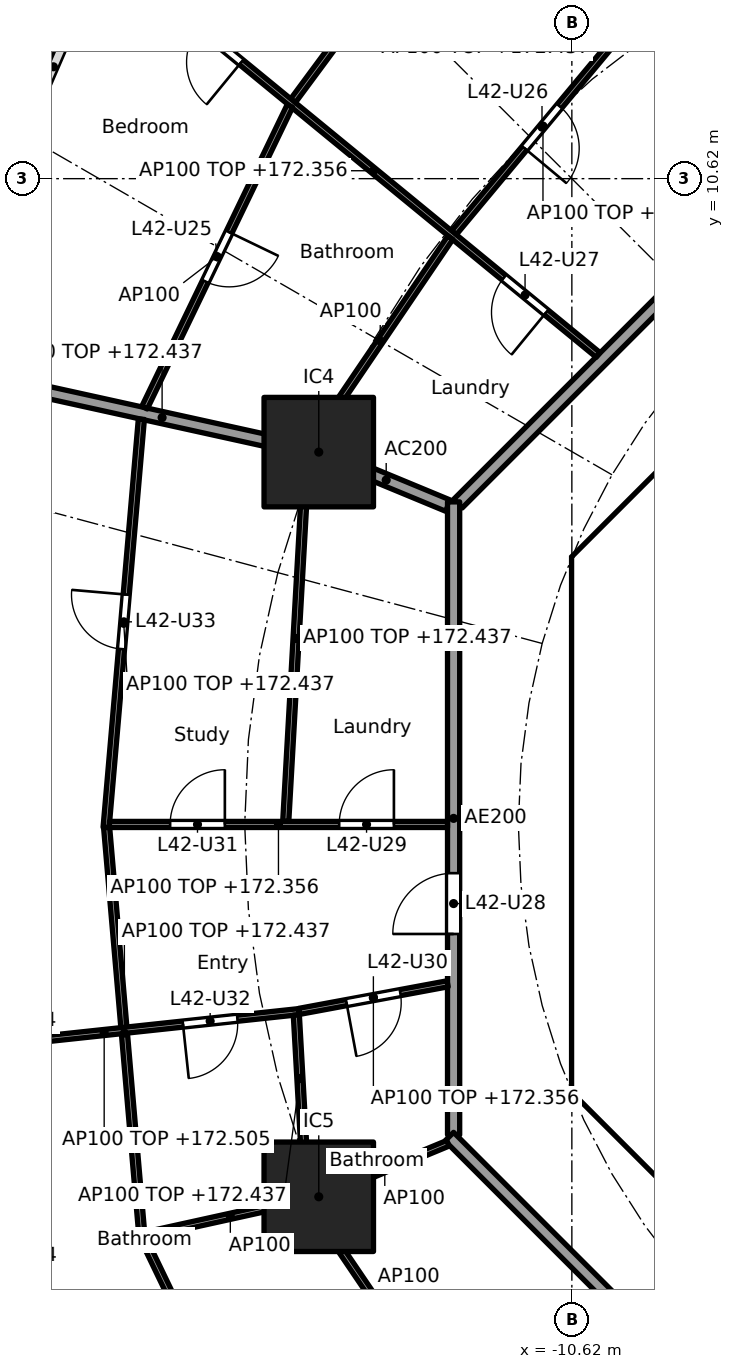
"""IFC4 building model, lengths in metres.
Left out: names, types, materials, properties, quantities, classifications, styles, units other than length and angle.
Written with IfcOpenShell. Run it as: python <this file> out.ifc"""

import sys

from ifc_helpers import new_model, si_unit, direction, frame, frame_2d, origin, origin_2d, place, context, subcontext, project, spatial, polyline, rectangle, outline, extrude, element, fill, save


model = new_model("IFC4")
c1 = context("Model", 3, precision=1e-05, world=origin(), true_north=direction((0.0, 1.0)))
c2 = subcontext(c1, "Body", "Model", "MODEL_VIEW")
j1 = project(units=[si_unit("LENGTHUNIT", "METRE"), si_unit("PLANEANGLEUNIT", "RADIAN")], contexts=[c1])
p1 = place(None, origin())
s1 = spatial("IfcSite", under=j1, at=p1, CompositionType="ELEMENT")
p2 = place(p1, origin())
s2 = spatial("IfcBuilding", under=s1, at=p2, CompositionType="ELEMENT")
p3 = place(p2, frame((0.0, 0.0, 169.6)))
s3 = spatial("IfcBuildingStorey", under=s2, at=p3, CompositionType="ELEMENT", Elevation=169.6)
for number, where, z_axis, x_axis in (
    (1, (-14.782, 6.123, 0.0), (0.0, 0.0, 1.0), (1.0, 0.0, 0.0)),
    (2, (-14.782, -6.123, 0.0), (0.0, 0.0, 1.0), (1.0, 0.0, 0.0)),
):
    element("IfcColumn", number, at=place(p3, frame(where, z_axis=z_axis, x_axis=x_axis)), inside=s3, PredefinedType="COLUMN", context=c2, shape_type="SweptSolid", body=[
        extrude(rectangle(XDim=1.8, YDim=1.8, at=origin_2d()), origin(), (0.0, 0.0, 1.0), 3.7),
    ])
p4 = place(p3, frame((-4.613, 9.988, 0.0), z_axis=(0.0, 0.0, 1.0), x_axis=(-0.707106781187, -0.707106781187, 0.0)))
e3 = element("IfcWall", 3, at=p4, inside=s3, PredefinedType="SHEAR", context=c2, shape_type="SweptSolid", body=[
    extrude(rectangle(XDim=7.602, YDim=0.6, at=frame_2d((3.801, 0.0))), origin(), (0.0, 0.0, 1.0), 3.44),
])
p5 = place(p4, frame((0.351, 0.0, 0.0)))
e4 = element("IfcOpeningElement", 4, at=p5, cuts=e3, PredefinedType="OPENING", context=c2, shape_type="SweptSolid", body=[
    extrude(rectangle(XDim=1.1, YDim=2.1, at=frame_2d((0.55, 1.05))), frame((0.0, 0.31, 0.0), z_axis=(0.0, -1.0, 0.0), x_axis=(1.0, 0.0, 0.0)), (0.0, 0.0, 1.0), 0.62),
])
p6 = place(p3, frame((-10.325, 3.801, 0.0), z_axis=(0.0, 0.0, 1.0), x_axis=(0.0, -1.0, 0.0)))
e5 = element("IfcWall", 5, at=p6, inside=s3, PredefinedType="SHEAR", context=c2, shape_type="SweptSolid", body=[
    extrude(rectangle(XDim=7.602, YDim=0.6, at=frame_2d((3.801, 0.0))), origin(), (0.0, 0.0, 1.0), 3.44),
])
p7 = place(p6, frame((0.651, 0.0, 0.0)))
e6 = element("IfcOpeningElement", 6, at=p7, cuts=e5, PredefinedType="OPENING", context=c2, shape_type="SweptSolid", body=[
    extrude(rectangle(XDim=1.5, YDim=2.1, at=frame_2d((0.75, 1.05))), frame((0.0, 0.31, 0.0), z_axis=(0.0, -1.0, 0.0), x_axis=(1.0, 0.0, 0.0)), (0.0, 0.0, 1.0), 0.62),
])
p8 = place(p6, frame((5.451, 0.0, 0.0)))
e7 = element("IfcOpeningElement", 7, at=p8, cuts=e5, PredefinedType="OPENING", context=c2, shape_type="SweptSolid", body=[
    extrude(rectangle(XDim=1.5, YDim=2.1, at=frame_2d((0.75, 1.05))), frame((0.0, 0.31, 0.0), z_axis=(0.0, -1.0, 0.0), x_axis=(1.0, 0.0, 0.0)), (0.0, 0.0, 1.0), 0.62),
])
p9 = place(p3, frame((-9.988, -4.613, 0.0), z_axis=(0.0, 0.0, 1.0), x_axis=(0.707106781187, -0.707106781187, 0.0)))
e8 = element("IfcWall", 8, at=p9, inside=s3, PredefinedType="SHEAR", context=c2, shape_type="SweptSolid", body=[
    extrude(rectangle(XDim=7.602, YDim=0.6, at=frame_2d((3.801, 0.0))), origin(), (0.0, 0.0, 1.0), 3.44),
])
p10 = place(p9, frame((6.151, 0.0, 0.0)))
e9 = element("IfcOpeningElement", 9, at=p10, cuts=e8, PredefinedType="OPENING", context=c2, shape_type="SweptSolid", body=[
    extrude(rectangle(XDim=1.1, YDim=2.1, at=frame_2d((0.55, 1.05))), frame((0.0, 0.31, 0.0), z_axis=(0.0, -1.0, 0.0), x_axis=(1.0, 0.0, 0.0)), (0.0, 0.0, 1.0), 0.62),
])
p11 = place(p3, origin())
e10 = element("IfcWall", 10, at=p11, inside=s3, PredefinedType="SHEAR", context=c2, shape_type="SweptSolid", body=[
    extrude(outline(polyline([(-10.625, -3.801), (-10.025, -3.801), (-10.025, -4.152), (-9.776, -4.401), (-10.2, -4.825), (-10.625, -4.401), (-10.625, -3.801)])), origin(), (0.0, 0.0, 1.0), 3.44),
])
p12 = place(p3, origin())
e11 = element("IfcWall", 11, at=p12, inside=s3, PredefinedType="SHEAR", context=c2, shape_type="SweptSolid", body=[
    extrude(outline(polyline([(-10.2, 4.825), (-9.776, 4.401), (-10.025, 4.152), (-10.025, 3.801), (-10.625, 3.801), (-10.625, 4.401), (-10.2, 4.825)])), origin(), (0.0, 0.0, 1.0), 3.44),
])
for number, where, z_axis, x_axis in (
    (12, (-10.025, -4.0, 0.0), (0.0, 0.0, 1.0), (1.0, 0.0, 0.0)),
    (13, (-10.025, 4.0, 0.0), (0.0, 0.0, 1.0), (1.0, 0.0, 0.0)),
):
    element("IfcWall", number, at=place(p3, frame(where, z_axis=z_axis, x_axis=x_axis)), inside=s3, PredefinedType="PARTITIONING", context=c2, shape_type="SweptSolid", body=[
        extrude(rectangle(XDim=3.325, YDim=0.2, at=frame_2d((1.662, 0.0))), origin(), (0.0, 0.0, 1.0), 3.44),
    ])
p13 = place(p3, frame((-12.657, 5.243, 0.0), z_axis=(0.0, 0.0, 1.0), x_axis=(-0.923859888513, 0.38273085373, 0.0)))
e14 = element("IfcWall", 14, at=p13, inside=s3, PredefinedType="PARTITIONING", context=c2, shape_type="SweptSolid", body=[
    extrude(rectangle(XDim=2.199, YDim=0.2, at=frame_2d((1.1, 0.0))), origin(), (0.0, 0.0, 1.0), 3.44),
])
p14 = place(p3, frame((-14.831, 6.134, 0.0), z_axis=(0.0, 0.0, 1.0), x_axis=(-0.976568396888, 0.215207263354, 0.0)))
e15 = element("IfcWall", 15, at=p14, inside=s3, PredefinedType="PARTITIONING", context=c2, shape_type="SweptSolid", body=[
    extrude(rectangle(XDim=5.177, YDim=0.2, at=frame_2d((2.588, 0.0))), origin(), (0.0, 0.0, 1.0), 2.837),
])
p15 = place(p3, frame((-5.275, 12.494, 0.0), z_axis=(0.0, 0.0, 1.0), x_axis=(-0.707106781187, -0.707106781187, 0.0)))
e16 = element("IfcWall", 16, at=p15, inside=s3, PredefinedType="PARTITIONING", context=c2, shape_type="SweptSolid", body=[
    extrude(rectangle(XDim=10.209, YDim=0.2, at=frame_2d((5.104, 0.0))), origin(), (0.0, 0.0, 1.0), 3.44),
])
p16 = place(p3, frame((-12.565, 5.304, 0.0), z_axis=(0.0, 0.0, 1.0), x_axis=(0.0, -1.0, 0.0)))
e17 = element("IfcWall", 17, at=p16, inside=s3, PredefinedType="PARTITIONING", context=c2, shape_type="SweptSolid", body=[
    extrude(rectangle(XDim=10.409, YDim=0.2, at=frame_2d((5.205, 0.0))), origin(), (0.0, 0.0, 1.0), 3.44),
])
p17 = place(p16, frame((6.106, 0.0, 0.0)))
e18 = element("IfcOpeningElement", 18, at=p17, cuts=e17, PredefinedType="OPENING", context=c2, shape_type="SweptSolid", body=[
    extrude(rectangle(XDim=1.0, YDim=2.1, at=frame_2d((0.5, 1.05))), frame((0.0, 0.11, 0.0), z_axis=(0.0, -1.0, 0.0), x_axis=(1.0, 0.0, 0.0)), (0.0, 0.0, 1.0), 0.22),
])
p18 = place(p3, frame((-12.635, -5.134, 0.0), z_axis=(0.0, 0.0, 1.0), x_axis=(0.707106781187, -0.707106781187, 0.0)))
e19 = element("IfcWall", 19, at=p18, inside=s3, PredefinedType="PARTITIONING", context=c2, shape_type="SweptSolid", body=[
    extrude(rectangle(XDim=10.609, YDim=0.2, at=frame_2d((5.305, 0.0))), origin(), (0.0, 0.0, 1.0), 3.44),
])
p19 = place(p3, frame((-9.631, 13.242, 0.0), z_axis=(0.0, 0.0, 1.0), x_axis=(-0.640315711982, -0.768111833647, 0.0)))
e20 = element("IfcWall", 20, at=p19, inside=s3, PredefinedType="PARTITIONING", context=c2, shape_type="SweptSolid", body=[
    extrude(rectangle(XDim=4.572, YDim=0.1, at=frame_2d((2.286, 0.0))), origin(), (0.0, 0.0, 1.0), 2.837),
])
p20 = place(p19, frame((1.861, 0.0, 0.0)))
e21 = element("IfcOpeningElement", 21, at=p20, cuts=e20, PredefinedType="OPENING", context=c2, shape_type="SweptSolid", body=[
    extrude(rectangle(XDim=0.9, YDim=2.1, at=frame_2d((0.45, 1.05))), frame((0.0, 0.06, 0.0), z_axis=(0.0, -1.0, 0.0), x_axis=(1.0, 0.0, 0.0)), (0.0, 0.0, 1.0), 0.12),
])
p21 = place(p3, frame((-11.773, 16.542, 0.0), z_axis=(0.0, 0.0, 1.0), x_axis=(-0.594694305999, -0.803951915485, 0.0)))
e22 = element("IfcWall", 22, at=p21, inside=s3, PredefinedType="PARTITIONING", context=c2, shape_type="SweptSolid", body=[
    extrude(rectangle(XDim=5.772, YDim=0.1, at=frame_2d((2.886, 0.0))), origin(), (0.0, 0.0, 1.0), 2.837),
])
p22 = place(p21, frame((2.461, 0.0, 0.0)))
e23 = element("IfcOpeningElement", 23, at=p22, cuts=e22, PredefinedType="OPENING", context=c2, shape_type="SweptSolid", body=[
    extrude(rectangle(XDim=0.9, YDim=2.1, at=frame_2d((0.45, 1.05))), frame((0.0, 0.06, 0.0), z_axis=(0.0, -1.0, 0.0), x_axis=(1.0, 0.0, 0.0)), (0.0, 0.0, 1.0), 0.12),
])
p23 = place(p3, frame((-10.189, 7.721, 0.0), z_axis=(0.0, 0.0, 1.0), x_axis=(-0.773134429339, 0.634242188892, 0.0)))
e24 = element("IfcWall", 24, at=p23, inside=s3, PredefinedType="PARTITIONING", context=c2, shape_type="SweptSolid", body=[
    extrude(rectangle(XDim=9.552, YDim=0.1, at=frame_2d((4.776, 0.0))), origin(), (0.0, 0.0, 1.0), 2.756),
])
p24 = place(p23, frame((7.59, 0.0, 0.0)))
e25 = element("IfcOpeningElement", 25, at=p24, cuts=e24, PredefinedType="OPENING", context=c2, shape_type="SweptSolid", body=[
    extrude(rectangle(XDim=0.9, YDim=2.1, at=frame_2d((0.45, 1.05))), frame((0.0, 0.06, 0.0), z_axis=(0.0, -1.0, 0.0), x_axis=(1.0, 0.0, 0.0)), (0.0, 0.0, 1.0), 0.12),
])
p25 = place(p23, frame((1.104, 0.0, 0.0)))
e26 = element("IfcOpeningElement", 26, at=p25, cuts=e24, PredefinedType="OPENING", context=c2, shape_type="SweptSolid", body=[
    extrude(rectangle(XDim=0.9, YDim=2.1, at=frame_2d((0.45, 1.05))), frame((0.0, 0.06, 0.0), z_axis=(0.0, -1.0, 0.0), x_axis=(1.0, 0.0, 0.0)), (0.0, 0.0, 1.0), 0.12),
])
p26 = place(p3, frame((-12.619, 9.65, 0.0), z_axis=(0.0, 0.0, 1.0), x_axis=(-0.561046521684, -0.82778427172, 0.0)))
e27 = element("IfcWall", 27, at=p26, inside=s3, PredefinedType="PARTITIONING", context=c2, shape_type="SweptSolid", body=[
    extrude(rectangle(XDim=4.109, YDim=0.1, at=frame_2d((2.054, 0.0))), origin(), (0.0, 0.0, 1.0), 3.44),
])
p27 = place(p3, frame((-15.257, 11.816, 0.0), z_axis=(0.0, 0.0, 1.0), x_axis=(-0.434027506504, -0.900899619046, 0.0)))
e28 = element("IfcWall", 28, at=p27, inside=s3, PredefinedType="PARTITIONING", context=c2, shape_type="SweptSolid", body=[
    extrude(rectangle(XDim=5.508, YDim=0.1, at=frame_2d((2.754, 0.0))), origin(), (0.0, 0.0, 1.0), 3.44),
])
p28 = place(p27, frame((2.304, 0.0, 0.0)))
e29 = element("IfcOpeningElement", 29, at=p28, cuts=e28, PredefinedType="OPENING", context=c2, shape_type="SweptSolid", body=[
    extrude(rectangle(XDim=0.9, YDim=2.1, at=frame_2d((0.45, 1.05))), frame((0.0, 0.06, 0.0), z_axis=(0.0, -1.0, 0.0), x_axis=(1.0, 0.0, 0.0)), (0.0, 0.0, 1.0), 0.12),
])
p29 = place(p3, frame((-14.986, 6.067, 0.0), z_axis=(0.0, 0.0, 1.0), x_axis=(-0.056311398802, -0.998413254302, 0.0)))
e30 = element("IfcWall", 30, at=p29, inside=s3, PredefinedType="PARTITIONING", context=c2, shape_type="SweptSolid", body=[
    extrude(rectangle(XDim=6.026, YDim=0.1, at=frame_2d((3.013, 0.0))), origin(), (0.0, 0.0, 1.0), 2.837),
])
p30 = place(p3, frame((-17.7, 6.664, 0.0), z_axis=(0.0, 0.0, 1.0), x_axis=(-0.086004282666, -0.996294767307, 0.0)))
e31 = element("IfcWall", 31, at=p30, inside=s3, PredefinedType="PARTITIONING", context=c2, shape_type="SweptSolid", body=[
    extrude(rectangle(XDim=6.739, YDim=0.1, at=frame_2d((3.37, 0.0))), origin(), (0.0, 0.0, 1.0), 2.837),
])
p31 = place(p30, frame((2.895, 0.0, 0.0)))
e32 = element("IfcOpeningElement", 32, at=p31, cuts=e31, PredefinedType="OPENING", context=c2, shape_type="SweptSolid", body=[
    extrude(rectangle(XDim=0.9, YDim=2.1, at=frame_2d((0.45, 1.05))), frame((0.0, 0.06, 0.0), z_axis=(0.0, -1.0, 0.0), x_axis=(1.0, 0.0, 0.0)), (0.0, 0.0, 1.0), 0.12),
])
p32 = place(p3, frame((-12.665, 0.0, 0.0), z_axis=(0.0, 0.0, 1.0), x_axis=(-1.0, 0.0, 0.0)))
e33 = element("IfcWall", 33, at=p32, inside=s3, PredefinedType="PARTITIONING", context=c2, shape_type="SweptSolid", body=[
    extrude(rectangle(XDim=5.56, YDim=0.1, at=frame_2d((2.78, 0.0))), origin(), (0.0, 0.0, 1.0), 2.756),
])
p33 = place(p32, frame((0.882, 0.0, 0.0)))
e34 = element("IfcOpeningElement", 34, at=p33, cuts=e33, PredefinedType="OPENING", context=c2, shape_type="SweptSolid", body=[
    extrude(rectangle(XDim=0.9, YDim=2.1, at=frame_2d((0.45, 1.05))), frame((0.0, 0.06, 0.0), z_axis=(0.0, -1.0, 0.0), x_axis=(1.0, 0.0, 0.0)), (0.0, 0.0, 1.0), 0.12),
])
p34 = place(p32, frame((3.662, 0.0, 0.0)))
e35 = element("IfcOpeningElement", 35, at=p34, cuts=e33, PredefinedType="OPENING", context=c2, shape_type="SweptSolid", body=[
    extrude(rectangle(XDim=0.9, YDim=2.1, at=frame_2d((0.45, 1.05))), frame((0.0, 0.06, 0.0), z_axis=(0.0, -1.0, 0.0), x_axis=(1.0, 0.0, 0.0)), (0.0, 0.0, 1.0), 0.12),
])
p35 = place(p3, frame((-18.271, -0.05, 0.0), z_axis=(0.0, 0.0, 1.0), x_axis=(0.086018199227, -0.996293565874, 0.0)))
e36 = element("IfcWall", 36, at=p35, inside=s3, PredefinedType="PARTITIONING", context=c2, shape_type="SweptSolid", body=[
    extrude(rectangle(XDim=6.789, YDim=0.1, at=frame_2d((3.395, 0.0))), origin(), (0.0, 0.0, 1.0), 2.837),
])
p36 = place(p3, frame((-12.663, -2.621, 0.0), z_axis=(0.0, 0.0, 1.0), x_axis=(-0.983176884312, -0.182655999505, 0.0)))
e37 = element("IfcWall", 37, at=p36, inside=s3, PredefinedType="PARTITIONING", context=c2, shape_type="SweptSolid", body=[
    extrude(rectangle(XDim=2.483, YDim=0.1, at=frame_2d((1.242, 0.0))), origin(), (0.0, 0.0, 1.0), 2.756),
])
p37 = place(p36, frame((0.792, 0.0, 0.0)))
e38 = element("IfcOpeningElement", 38, at=p37, cuts=e37, PredefinedType="OPENING", context=c2, shape_type="SweptSolid", body=[
    extrude(rectangle(XDim=0.9, YDim=2.1, at=frame_2d((0.45, 1.05))), frame((0.0, 0.06, 0.0), z_axis=(0.0, -1.0, 0.0), x_axis=(1.0, 0.0, 0.0)), (0.0, 0.0, 1.0), 0.12),
])
p38 = place(p3, frame((-15.104, -3.078, 0.0), z_axis=(0.0, 0.0, 1.0), x_axis=(-0.994316167803, -0.106467640365, 0.0)))
e39 = element("IfcWall", 39, at=p38, inside=s3, PredefinedType="PARTITIONING", context=c2, shape_type="SweptSolid", body=[
    extrude(rectangle(XDim=6.45, YDim=0.1, at=frame_2d((3.225, 0.0))), origin(), (0.0, 0.0, 1.0), 2.905),
])
p39 = place(p38, frame((1.022, 0.0, 0.0)))
e40 = element("IfcOpeningElement", 40, at=p39, cuts=e39, PredefinedType="OPENING", context=c2, shape_type="SweptSolid", body=[
    extrude(rectangle(XDim=0.9, YDim=2.1, at=frame_2d((0.45, 1.05))), frame((0.0, 0.06, 0.0), z_axis=(0.0, -1.0, 0.0), x_axis=(1.0, 0.0, 0.0)), (0.0, 0.0, 1.0), 0.12),
])
p40 = place(p38, frame((4.223, 0.0, 0.0)))
e41 = element("IfcOpeningElement", 41, at=p40, cuts=e39, PredefinedType="OPENING", context=c2, shape_type="SweptSolid", body=[
    extrude(rectangle(XDim=0.9, YDim=2.1, at=frame_2d((0.45, 1.05))), frame((0.0, 0.06, 0.0), z_axis=(0.0, -1.0, 0.0), x_axis=(1.0, 0.0, 0.0)), (0.0, 0.0, 1.0), 0.12),
])
p41 = place(p3, frame((-15.151, -3.133, 0.0), z_axis=(0.0, 0.0, 1.0), x_axis=(0.05637501378, -0.998409664327, 0.0)))
e42 = element("IfcWall", 42, at=p41, inside=s3, PredefinedType="PARTITIONING", context=c2, shape_type="SweptSolid", body=[
    extrude(rectangle(XDim=2.988, YDim=0.1, at=frame_2d((1.494, 0.0))), origin(), (0.0, 0.0, 1.0), 2.837),
])
p42 = place(p3, frame((-12.657, -5.243, 0.0), z_axis=(0.0, 0.0, 1.0), x_axis=(-0.923848837015, -0.382757529444, 0.0)))
e43 = element("IfcWall", 43, at=p42, inside=s3, PredefinedType="PARTITIONING", context=c2, shape_type="SweptSolid", body=[
    extrude(rectangle(XDim=2.25, YDim=0.1, at=frame_2d((1.125, 0.0))), origin(), (0.0, 0.0, 1.0), 3.44),
])
p43 = place(p3, frame((-14.831, -6.134, 0.0), z_axis=(0.0, 0.0, 1.0), x_axis=(-0.976560749847, -0.215241961191, 0.0)))
e44 = element("IfcWall", 44, at=p43, inside=s3, PredefinedType="PARTITIONING", context=c2, shape_type="SweptSolid", body=[
    extrude(rectangle(XDim=2.879, YDim=0.1, at=frame_2d((1.439, 0.0))), origin(), (0.0, 0.0, 1.0), 3.44),
])
p44 = place(p3, frame((-14.952, -6.208, 0.0), z_axis=(0.0, 0.0, 1.0), x_axis=(0.561064907171, -0.827771810308, 0.0)))
e45 = element("IfcWall", 45, at=p44, inside=s3, PredefinedType="PARTITIONING", context=c2, shape_type="SweptSolid", body=[
    extrude(rectangle(XDim=4.159, YDim=0.1, at=frame_2d((2.079, 0.0))), origin(), (0.0, 0.0, 1.0), 3.44),
])
p45 = place(p3, frame((-17.669, -6.809, 0.0), z_axis=(0.0, 0.0, 1.0), x_axis=(0.434040130629, -0.900893536997, 0.0)))
e46 = element("IfcWall", 46, at=p45, inside=s3, PredefinedType="PARTITIONING", context=c2, shape_type="SweptSolid", body=[
    extrude(rectangle(XDim=5.558, YDim=0.1, at=frame_2d((2.779, 0.0))), origin(), (0.0, 0.0, 1.0), 3.44),
])
p46 = place(p45, frame((2.329, 0.0, 0.0)))
e47 = element("IfcOpeningElement", 47, at=p46, cuts=e46, PredefinedType="OPENING", context=c2, shape_type="SweptSolid", body=[
    extrude(rectangle(XDim=0.9, YDim=2.1, at=frame_2d((0.45, 1.05))), frame((0.0, 0.06, 0.0), z_axis=(0.0, -1.0, 0.0), x_axis=(1.0, 0.0, 0.0)), (0.0, 0.0, 1.0), 0.12),
])
p47 = place(p7, origin())
e48 = element("IfcDoor", 48, at=p47, inside=s3, OperationType="DOUBLE_DOOR_SINGLE_SWING", PredefinedType="DOOR", context=c2, shape_type="SweptSolid", body=[
    extrude(rectangle(XDim=1.5, YDim=2.1, at=frame_2d((0.75, 1.05))), frame((0.0, 0.025, 0.0), z_axis=(0.0, -1.0, 0.0), x_axis=(1.0, 0.0, 0.0)), (0.0, 0.0, 1.0), 0.05),
])
fill(e6, e48)
p48 = place(p8, origin())
e49 = element("IfcDoor", 49, at=p48, inside=s3, OperationType="DOUBLE_DOOR_SINGLE_SWING", PredefinedType="DOOR", context=c2, shape_type="SweptSolid", body=[
    extrude(rectangle(XDim=1.5, YDim=2.1, at=frame_2d((0.75, 1.05))), frame((0.0, 0.025, 0.0), z_axis=(0.0, -1.0, 0.0), x_axis=(1.0, 0.0, 0.0)), (0.0, 0.0, 1.0), 0.05),
])
fill(e7, e49)
p49 = place(p24, origin())
e50 = element("IfcDoor", 50, at=p49, inside=s3, OperationType="SINGLE_SWING_LEFT", PredefinedType="DOOR", context=c2, shape_type="SweptSolid", body=[
    extrude(rectangle(XDim=0.9, YDim=2.1, at=frame_2d((0.45, 1.05))), frame((0.0, 0.025, 0.0), z_axis=(0.0, -1.0, 0.0), x_axis=(1.0, 0.0, 0.0)), (0.0, 0.0, 1.0), 0.05),
])
fill(e25, e50)
p50 = place(p28, origin())
e51 = element("IfcDoor", 51, at=p50, inside=s3, OperationType="SINGLE_SWING_LEFT", PredefinedType="DOOR", context=c2, shape_type="SweptSolid", body=[
    extrude(rectangle(XDim=0.9, YDim=2.1, at=frame_2d((0.45, 1.05))), frame((0.0, 0.025, 0.0), z_axis=(0.0, -1.0, 0.0), x_axis=(1.0, 0.0, 0.0)), (0.0, 0.0, 1.0), 0.05),
])
fill(e29, e51)
p51 = place(p20, origin())
e52 = element("IfcDoor", 52, at=p51, inside=s3, OperationType="SINGLE_SWING_RIGHT", PredefinedType="DOOR", context=c2, shape_type="SweptSolid", body=[
    extrude(rectangle(XDim=0.9, YDim=2.1, at=frame_2d((0.45, 1.05))), frame((0.0, 0.025, 0.0), z_axis=(0.0, -1.0, 0.0), x_axis=(1.0, 0.0, 0.0)), (0.0, 0.0, 1.0), 0.05),
])
fill(e21, e52)
p52 = place(p25, origin())
e53 = element("IfcDoor", 53, at=p52, inside=s3, OperationType="SINGLE_SWING_LEFT", PredefinedType="DOOR", context=c2, shape_type="SweptSolid", body=[
    extrude(rectangle(XDim=0.9, YDim=2.1, at=frame_2d((0.45, 1.05))), frame((0.0, 0.025, 0.0), z_axis=(0.0, -1.0, 0.0), x_axis=(1.0, 0.0, 0.0)), (0.0, 0.0, 1.0), 0.05),
])
fill(e26, e53)
p53 = place(p17, frame((1.0, 0.0, 0.0), x_axis=(-1.0, 0.0, 0.0)))
e54 = element("IfcDoor", 54, at=p53, inside=s3, OperationType="SINGLE_SWING_LEFT", PredefinedType="DOOR", context=c2, shape_type="SweptSolid", body=[
    extrude(rectangle(XDim=1.0, YDim=2.1, at=frame_2d((0.5, 1.05))), frame((0.0, 0.025, 0.0), z_axis=(0.0, -1.0, 0.0), x_axis=(1.0, 0.0, 0.0)), (0.0, 0.0, 1.0), 0.05),
])
fill(e18, e54)
p54 = place(p33, frame((0.9, 0.0, 0.0), x_axis=(-1.0, 0.0, 0.0)))
e55 = element("IfcDoor", 55, at=p54, inside=s3, OperationType="SINGLE_SWING_RIGHT", PredefinedType="DOOR", context=c2, shape_type="SweptSolid", body=[
    extrude(rectangle(XDim=0.9, YDim=2.1, at=frame_2d((0.45, 1.05))), frame((0.0, 0.025, 0.0), z_axis=(0.0, -1.0, 0.0), x_axis=(1.0, 0.0, 0.0)), (0.0, 0.0, 1.0), 0.05),
])
fill(e34, e55)
p55 = place(p37, origin())
e56 = element("IfcDoor", 56, at=p55, inside=s3, OperationType="SINGLE_SWING_RIGHT", PredefinedType="DOOR", context=c2, shape_type="SweptSolid", body=[
    extrude(rectangle(XDim=0.9, YDim=2.1, at=frame_2d((0.45, 1.05))), frame((0.0, 0.025, 0.0), z_axis=(0.0, -1.0, 0.0), x_axis=(1.0, 0.0, 0.0)), (0.0, 0.0, 1.0), 0.05),
])
fill(e38, e56)
p56 = place(p34, frame((0.9, 0.0, 0.0), x_axis=(-1.0, 0.0, 0.0)))
e57 = element("IfcDoor", 57, at=p56, inside=s3, OperationType="SINGLE_SWING_RIGHT", PredefinedType="DOOR", context=c2, shape_type="SweptSolid", body=[
    extrude(rectangle(XDim=0.9, YDim=2.1, at=frame_2d((0.45, 1.05))), frame((0.0, 0.025, 0.0), z_axis=(0.0, -1.0, 0.0), x_axis=(1.0, 0.0, 0.0)), (0.0, 0.0, 1.0), 0.05),
])
fill(e35, e57)
p57 = place(p39, origin())
e58 = element("IfcDoor", 58, at=p57, inside=s3, OperationType="SINGLE_SWING_RIGHT", PredefinedType="DOOR", context=c2, shape_type="SweptSolid", body=[
    extrude(rectangle(XDim=0.9, YDim=2.1, at=frame_2d((0.45, 1.05))), frame((0.0, 0.025, 0.0), z_axis=(0.0, -1.0, 0.0), x_axis=(1.0, 0.0, 0.0)), (0.0, 0.0, 1.0), 0.05),
])
fill(e40, e58)
p58 = place(p31, frame((0.9, 0.0, 0.0), x_axis=(-1.0, 0.0, 0.0)))
e59 = element("IfcDoor", 59, at=p58, inside=s3, OperationType="SINGLE_SWING_RIGHT", PredefinedType="DOOR", context=c2, shape_type="SweptSolid", body=[
    extrude(rectangle(XDim=0.9, YDim=2.1, at=frame_2d((0.45, 1.05))), frame((0.0, 0.025, 0.0), z_axis=(0.0, -1.0, 0.0), x_axis=(1.0, 0.0, 0.0)), (0.0, 0.0, 1.0), 0.05),
])
fill(e32, e59)
save(model, sys.argv[1])
